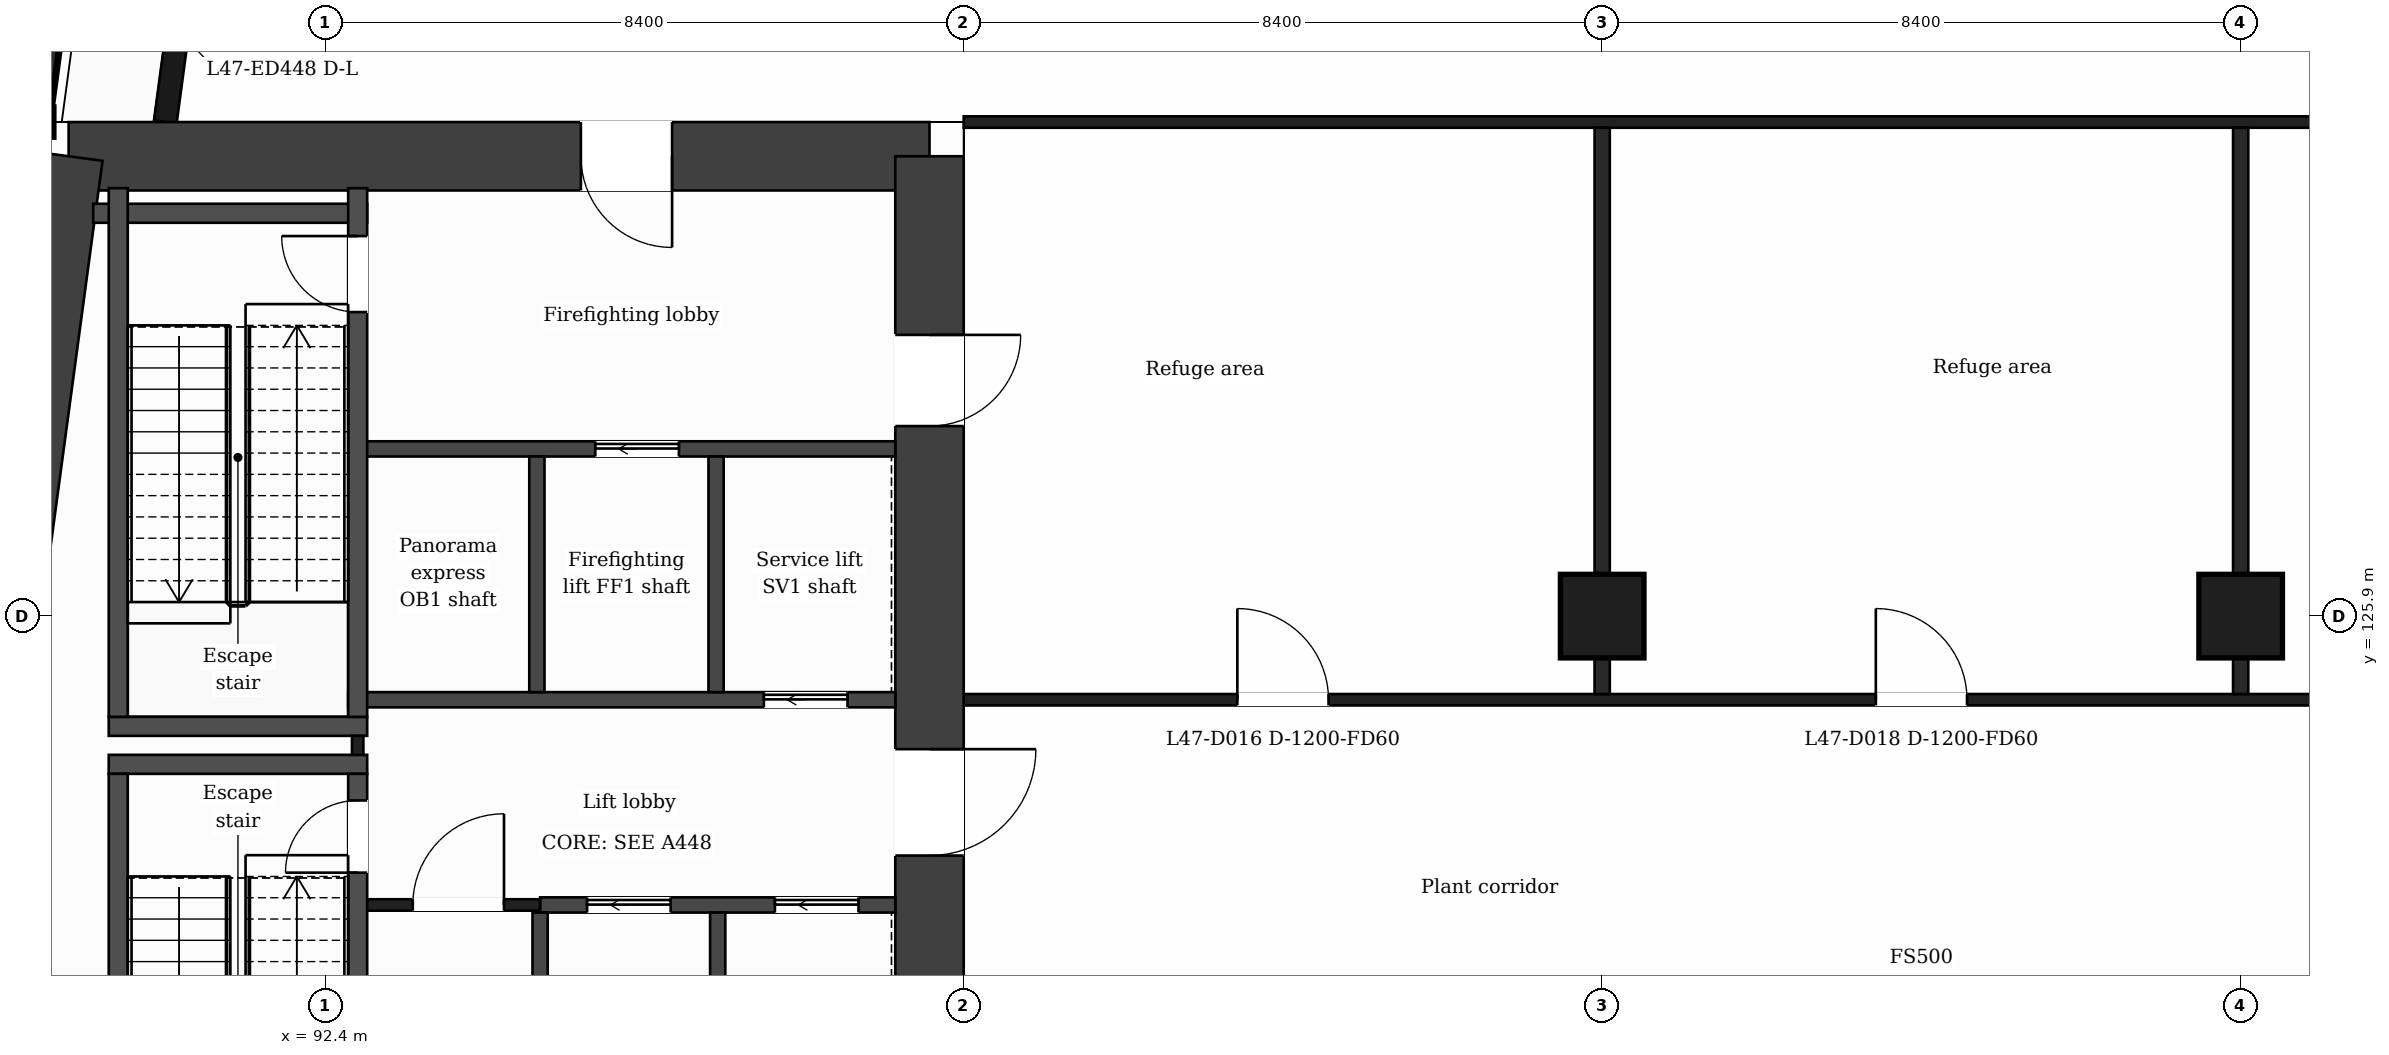
"""IFC4 building model, lengths in metres.
Left out: names, types, materials, properties, quantities, classifications, styles, units other than length and angle.
Written with IfcOpenShell. Run it as: python <this file> out.ifc"""

import sys

from ifc_helpers import new_model, si_unit, direction, frame, frame_2d, origin, origin_2d, place, context, subcontext, project, spatial, rectangle, extrude, element, fill, save


model = new_model("IFC4")
c1 = context("Model", 3, precision=1e-05, world=origin(), true_north=direction((0.0, 1.0)))
c2 = subcontext(c1, "Body", "Model", "MODEL_VIEW")
j1 = project(units=[si_unit("LENGTHUNIT", "METRE"), si_unit("PLANEANGLEUNIT", "RADIAN")], contexts=[c1])
p1 = place(None, origin())
s1 = spatial("IfcSite", under=j1, at=p1, CompositionType="ELEMENT")
p2 = place(p1, origin())
s2 = spatial("IfcBuilding", under=s1, at=p2, CompositionType="ELEMENT")
p3 = place(p2, frame((0.0, 0.0, 197.2)))
s3 = spatial("IfcBuildingStorey", under=s2, at=p3, CompositionType="ELEMENT", Elevation=197.2)
p4 = place(p3, frame((89.024, 131.95, 0.0), z_axis=(0.0, 0.0, 1.0), x_axis=(1.0, 0.0, 0.0)))
e1 = element("IfcWall", 1, at=p4, inside=s3, PredefinedType="SHEAR", context=c2, shape_type="SweptSolid", body=[
    extrude(rectangle(XDim=11.326, YDim=0.9, at=frame_2d((5.663, 0.0))), origin(), (0.0, 0.0, 1.0), 5.0),
])
p5 = place(p4, frame((6.739, 0.0, 0.0)))
e2 = element("IfcOpeningElement", 2, at=p5, cuts=e1, PredefinedType="OPENING", context=c2, shape_type="SweptSolid", body=[
    extrude(rectangle(XDim=1.2, YDim=2.1, at=frame_2d((0.6, 1.05))), frame((0.0, 0.46, 0.0), z_axis=(0.0, -1.0, 0.0), x_axis=(1.0, 0.0, 0.0)), (0.0, 0.0, 1.0), 0.92),
])
p6 = place(p3, frame((100.35, 131.95, 0.0), z_axis=(0.0, 0.0, 1.0), x_axis=(0.0, -1.0, 0.0)))
e3 = element("IfcWall", 3, at=p6, inside=s3, PredefinedType="SHEAR", context=c2, shape_type="SweptSolid", body=[
    extrude(rectangle(XDim=21.1, YDim=0.9, at=frame_2d((10.55, 0.0))), origin(), (0.0, 0.0, 1.0), 5.0),
])
p7 = place(p6, frame((2.35, 0.0, 0.0)))
e4 = element("IfcOpeningElement", 4, at=p7, cuts=e3, PredefinedType="OPENING", context=c2, shape_type="SweptSolid", body=[
    extrude(rectangle(XDim=1.2, YDim=2.1, at=frame_2d((0.6, 1.05))), frame((0.0, 0.46, 0.0), z_axis=(0.0, -1.0, 0.0), x_axis=(1.0, 0.0, 0.0)), (0.0, 0.0, 1.0), 0.92),
])
p8 = place(p6, frame((7.8, 0.0, 0.0)))
e5 = element("IfcOpeningElement", 5, at=p8, cuts=e3, PredefinedType="OPENING", context=c2, shape_type="SweptSolid", body=[
    extrude(rectangle(XDim=1.4, YDim=2.1, at=frame_2d((0.7, 1.05))), frame((0.0, 0.46, 0.0), z_axis=(0.0, -1.0, 0.0), x_axis=(1.0, 0.0, 0.0)), (0.0, 0.0, 1.0), 0.92),
])
p9 = place(p3, frame((86.184, 110.85, 0.0), z_axis=(0.0, 0.0, 1.0), x_axis=(0.133410495943, 0.991060865725, 0.0)))
e6 = element("IfcWall", 6, at=p9, inside=s3, PredefinedType="SHEAR", context=c2, shape_type="SweptSolid", body=[
    extrude(rectangle(XDim=21.29, YDim=0.9, at=frame_2d((10.645, 0.0))), origin(), (0.0, 0.0, 1.0), 5.0),
])
for number, where, z_axis, x_axis in (
    (7, (109.2, 125.9, 0.0), (0.0, 0.0, 1.0), (1.0, 0.0, 0.0)),
    (8, (117.6, 125.9, 0.0), (0.0, 0.0, 1.0), (1.0, 0.0, 0.0)),
):
    element("IfcColumn", number, at=place(p3, frame(where, z_axis=z_axis, x_axis=x_axis)), inside=s3, PredefinedType="COLUMN", context=c2, shape_type="SweptSolid", body=[
        extrude(rectangle(XDim=1.1, YDim=1.1, at=origin_2d()), origin(), (0.0, 0.0, 1.0), 5.0),
    ])
p10 = place(p3, frame((91.177, 138.95, 0.0), z_axis=(0.0, 0.0, 1.0), x_axis=(-0.133426664613, -0.991058689065, 0.0)))
e9 = element("IfcWall", 9, at=p10, inside=s3, PredefinedType="SOLIDWALL", context=c2, shape_type="SweptSolid", body=[
    extrude(rectangle(XDim=6.609, YDim=0.3, at=frame_2d((3.305, 0.0))), origin(), (0.0, 0.0, 1.0), 4.68),
])
p11 = place(p10, frame((4.294, 0.0, 0.0)))
e10 = element("IfcOpeningElement", 10, at=p11, cuts=e9, PredefinedType="OPENING", context=c2, shape_type="SweptSolid", body=[
    extrude(rectangle(XDim=1.2, YDim=2.4, at=frame_2d((0.6, 1.2))), frame((0.0, 0.16, 0.0), z_axis=(0.0, -1.0, 0.0), x_axis=(1.0, 0.0, 0.0)), (0.0, 0.0, 1.0), 0.32),
])
p12 = place(p3, frame((95.227, 122.1, 0.0), z_axis=(0.0, 0.0, 1.0), x_axis=(1.0, 0.0, 0.0)))
e11 = element("IfcWall", 11, at=p12, inside=s3, PredefinedType="PARTITIONING", context=c2, shape_type="SweptSolid", body=[
    extrude(rectangle(XDim=4.673, YDim=0.2, at=frame_2d((2.336, 0.0))), origin(), (0.0, 0.0, 1.0), 4.68),
])
p13 = place(p12, frame((0.618, 0.0, 0.0)))
e12 = element("IfcOpeningElement", 12, at=p13, cuts=e11, PredefinedType="OPENING", context=c2, shape_type="SweptSolid", body=[
    extrude(rectangle(XDim=1.1, YDim=2.1, at=frame_2d((0.55, 1.05))), frame((0.0, 0.11, 0.0), z_axis=(0.0, -1.0, 0.0), x_axis=(1.0, 0.0, 0.0)), (0.0, 0.0, 1.0), 0.22),
])
p14 = place(p12, frame((3.089, 0.0, 0.0)))
e13 = element("IfcOpeningElement", 13, at=p14, cuts=e11, PredefinedType="OPENING", context=c2, shape_type="SweptSolid", body=[
    extrude(rectangle(XDim=1.1, YDim=2.1, at=frame_2d((0.55, 1.05))), frame((0.0, 0.11, 0.0), z_axis=(0.0, -1.0, 0.0), x_axis=(1.0, 0.0, 0.0)), (0.0, 0.0, 1.0), 0.22),
])
p15 = place(p3, frame((92.827, 122.1, 0.0), z_axis=(0.0, 0.0, 1.0), x_axis=(1.0, 0.0, 0.0)))
e14 = element("IfcWall", 14, at=p15, inside=s3, PredefinedType="PARTITIONING", context=c2, shape_type="SweptSolid", body=[
    extrude(rectangle(XDim=2.4, YDim=0.15, at=frame_2d((1.2, 0.0))), origin(), (0.0, 0.0, 1.0), 4.68),
])
p16 = place(p15, frame((0.725, 0.0, 0.0)))
e15 = element("IfcOpeningElement", 15, at=p16, cuts=e14, PredefinedType="OPENING", context=c2, shape_type="SweptSolid", body=[
    extrude(rectangle(XDim=1.2, YDim=2.1, at=frame_2d((0.6, 1.05))), frame((0.0, 0.085, 0.0), z_axis=(0.0, -1.0, 0.0), x_axis=(1.0, 0.0, 0.0)), (0.0, 0.0, 1.0), 0.17),
])
for number, where, z_axis, x_axis in (
    (16, (89.552, 123.95, 0.0), (0.0, 0.0, 1.0), (1.0, 0.0, 0.0)),
    (17, (89.552, 124.45, 0.0), (0.0, 0.0, 1.0), (1.0, 0.0, 0.0)),
):
    element("IfcWall", number, at=place(p3, frame(where, z_axis=z_axis, x_axis=x_axis)), inside=s3, PredefinedType="PARTITIONING", context=c2, shape_type="SweptSolid", body=[
        extrude(rectangle(XDim=3.4, YDim=0.25, at=frame_2d((1.7, 0.0))), origin(), (0.0, 0.0, 1.0), 4.68),
    ])
p17 = place(p3, frame((92.702, 124.8, 0.0), z_axis=(0.0, 0.0, 1.0), x_axis=(1.0, 0.0, 0.0)))
e18 = element("IfcWall", 18, at=p17, inside=s3, PredefinedType="PARTITIONING", context=c2, shape_type="SweptSolid", body=[
    extrude(rectangle(XDim=7.198, YDim=0.2, at=frame_2d((3.599, 0.0))), origin(), (0.0, 0.0, 1.0), 4.68),
])
p18 = place(p17, frame((5.469, 0.0, 0.0)))
e19 = element("IfcOpeningElement", 19, at=p18, cuts=e18, PredefinedType="OPENING", context=c2, shape_type="SweptSolid", body=[
    extrude(rectangle(XDim=1.1, YDim=2.1, at=frame_2d((0.55, 1.05))), frame((0.0, 0.11, 0.0), z_axis=(0.0, -1.0, 0.0), x_axis=(1.0, 0.0, 0.0)), (0.0, 0.0, 1.0), 0.22),
])
p19 = place(p3, frame((100.8, 124.8, 0.0), z_axis=(0.0, 0.0, 1.0), x_axis=(1.0, 0.0, 0.0)))
e20 = element("IfcWall", 20, at=p19, inside=s3, PredefinedType="PARTITIONING", context=c2, shape_type="SweptSolid", body=[
    extrude(rectangle(XDim=25.2, YDim=0.15, at=frame_2d((12.6, 0.0))), origin(), (0.0, 0.0, 1.0), 4.68),
])
p20 = place(p19, frame((3.6, 0.0, 0.0)))
e21 = element("IfcOpeningElement", 21, at=p20, cuts=e20, PredefinedType="OPENING", context=c2, shape_type="SweptSolid", body=[
    extrude(rectangle(XDim=1.2, YDim=2.1, at=frame_2d((0.6, 1.05))), frame((0.0, 0.085, 0.0), z_axis=(0.0, -1.0, 0.0), x_axis=(1.0, 0.0, 0.0)), (0.0, 0.0, 1.0), 0.17),
])
p21 = place(p19, frame((12.0, 0.0, 0.0)))
e22 = element("IfcOpeningElement", 22, at=p21, cuts=e20, PredefinedType="OPENING", context=c2, shape_type="SweptSolid", body=[
    extrude(rectangle(XDim=1.2, YDim=2.1, at=frame_2d((0.6, 1.05))), frame((0.0, 0.085, 0.0), z_axis=(0.0, -1.0, 0.0), x_axis=(1.0, 0.0, 0.0)), (0.0, 0.0, 1.0), 0.17),
])
p22 = place(p19, frame((20.4, 0.0, 0.0)))
e23 = element("IfcOpeningElement", 23, at=p22, cuts=e20, PredefinedType="OPENING", context=c2, shape_type="SweptSolid", body=[
    extrude(rectangle(XDim=1.2, YDim=2.1, at=frame_2d((0.6, 1.05))), frame((0.0, 0.085, 0.0), z_axis=(0.0, -1.0, 0.0), x_axis=(1.0, 0.0, 0.0)), (0.0, 0.0, 1.0), 0.17),
])
p23 = place(p3, frame((92.827, 128.1, 0.0), z_axis=(0.0, 0.0, 1.0), x_axis=(1.0, 0.0, 0.0)))
e24 = element("IfcWall", 24, at=p23, inside=s3, PredefinedType="PARTITIONING", context=c2, shape_type="SweptSolid", body=[
    extrude(rectangle(XDim=7.073, YDim=0.2, at=frame_2d((3.537, 0.0))), origin(), (0.0, 0.0, 1.0), 4.68),
])
p24 = place(p23, frame((3.126, 0.0, 0.0)))
e25 = element("IfcOpeningElement", 25, at=p24, cuts=e24, PredefinedType="OPENING", context=c2, shape_type="SweptSolid", body=[
    extrude(rectangle(XDim=1.1, YDim=2.1, at=frame_2d((0.55, 1.05))), frame((0.0, 0.11, 0.0), z_axis=(0.0, -1.0, 0.0), x_axis=(1.0, 0.0, 0.0)), (0.0, 0.0, 1.0), 0.22),
])
p25 = place(p3, frame((89.347, 131.2, 0.0), z_axis=(0.0, 0.0, 1.0), x_axis=(1.0, 0.0, 0.0)))
e26 = element("IfcWall", 26, at=p25, inside=s3, PredefinedType="PARTITIONING", context=c2, shape_type="SweptSolid", body=[
    extrude(rectangle(XDim=3.604, YDim=0.25, at=frame_2d((1.802, 0.0))), origin(), (0.0, 0.0, 1.0), 4.68),
])
p26 = place(p3, frame((100.8, 132.4, 0.0), z_axis=(0.0, 0.0, 1.0), x_axis=(1.0, 0.0, 0.0)))
e27 = element("IfcWall", 27, at=p26, inside=s3, PredefinedType="PARTITIONING", context=c2, shape_type="SweptSolid", body=[
    extrude(rectangle(XDim=25.2, YDim=0.15, at=frame_2d((12.6, 0.0))), origin(), (0.0, 0.0, 1.0), 4.68),
])
p27 = place(p3, frame((89.677, 116.87, 0.0), z_axis=(0.0, 0.0, 1.0), x_axis=(0.0, 1.0, 0.0)))
e28 = element("IfcWall", 28, at=p27, inside=s3, PredefinedType="PARTITIONING", context=c2, shape_type="SweptSolid", body=[
    extrude(rectangle(XDim=6.955, YDim=0.25, at=frame_2d((3.478, 0.0))), origin(), (0.0, 0.0, 1.0), 4.68),
])
p28 = place(p3, frame((89.677, 124.575, 0.0), z_axis=(0.0, 0.0, 1.0), x_axis=(0.0, 1.0, 0.0)))
e29 = element("IfcWall", 29, at=p28, inside=s3, PredefinedType="PARTITIONING", context=c2, shape_type="SweptSolid", body=[
    extrude(rectangle(XDim=6.955, YDim=0.25, at=frame_2d((3.478, 0.0))), origin(), (0.0, 0.0, 1.0), 4.68),
])
p29 = place(p3, frame((92.827, 124.075, 0.0), z_axis=(0.0, 0.0, 1.0), x_axis=(0.0, 1.0, 0.0)))
e30 = element("IfcWall", 30, at=p29, inside=s3, PredefinedType="PARTITIONING", context=c2, shape_type="SweptSolid", body=[
    extrude(rectangle(XDim=0.25, YDim=0.15, at=frame_2d((0.125, 0.0))), origin(), (0.0, 0.0, 1.0), 4.68),
])
p30 = place(p3, frame((92.827, 116.87, 0.0), z_axis=(0.0, 0.0, 1.0), x_axis=(0.0, 1.0, 0.0)))
e31 = element("IfcWall", 31, at=p30, inside=s3, PredefinedType="PARTITIONING", context=c2, shape_type="SweptSolid", body=[
    extrude(rectangle(XDim=6.955, YDim=0.25, at=frame_2d((3.478, 0.0))), origin(), (0.0, 0.0, 1.0), 4.68),
])
p31 = place(p30, frame((5.655, 0.0, 0.0)))
e32 = element("IfcOpeningElement", 32, at=p31, cuts=e31, PredefinedType="OPENING", context=c2, shape_type="SweptSolid", body=[
    extrude(rectangle(XDim=0.95, YDim=2.1, at=frame_2d((0.475, 1.05))), frame((0.0, 0.135, 0.0), z_axis=(0.0, -1.0, 0.0), x_axis=(1.0, 0.0, 0.0)), (0.0, 0.0, 1.0), 0.27),
])
p32 = place(p3, frame((92.827, 124.575, 0.0), z_axis=(0.0, 0.0, 1.0), x_axis=(0.0, 1.0, 0.0)))
e33 = element("IfcWall", 33, at=p32, inside=s3, PredefinedType="PARTITIONING", context=c2, shape_type="SweptSolid", body=[
    extrude(rectangle(XDim=6.955, YDim=0.25, at=frame_2d((3.478, 0.0))), origin(), (0.0, 0.0, 1.0), 4.68),
])
p33 = place(p32, frame((5.325, 0.0, 0.0)))
e34 = element("IfcOpeningElement", 34, at=p33, cuts=e33, PredefinedType="OPENING", context=c2, shape_type="SweptSolid", body=[
    extrude(rectangle(XDim=1.0, YDim=2.1, at=frame_2d((0.5, 1.05))), frame((0.0, 0.135, 0.0), z_axis=(0.0, -1.0, 0.0), x_axis=(1.0, 0.0, 0.0)), (0.0, 0.0, 1.0), 0.27),
])
p34 = place(p3, frame((95.185, 124.9, 0.0), z_axis=(0.0, 0.0, 1.0), x_axis=(0.0, 1.0, 0.0)))
e35 = element("IfcWall", 35, at=p34, inside=s3, PredefinedType="PARTITIONING", context=c2, shape_type="SweptSolid", body=[
    extrude(rectangle(XDim=3.1, YDim=0.2, at=frame_2d((1.55, 0.0))), origin(), (0.0, 0.0, 1.0), 4.68),
])
p35 = place(p3, frame((95.227, 116.87, 0.0), z_axis=(0.0, 0.0, 1.0), x_axis=(0.0, 1.0, 0.0)))
e36 = element("IfcWall", 36, at=p35, inside=s3, PredefinedType="PARTITIONING", context=c2, shape_type="SweptSolid", body=[
    extrude(rectangle(XDim=5.13, YDim=0.2, at=frame_2d((2.565, 0.0))), origin(), (0.0, 0.0, 1.0), 4.68),
])
p36 = place(p35, frame((0.68, 0.0, 0.0)))
e37 = element("IfcOpeningElement", 37, at=p36, cuts=e36, PredefinedType="OPENING", context=c2, shape_type="SweptSolid", body=[
    extrude(rectangle(XDim=0.9, YDim=2.1, at=frame_2d((0.45, 1.05))), frame((0.0, 0.11, 0.0), z_axis=(0.0, -1.0, 0.0), x_axis=(1.0, 0.0, 0.0)), (0.0, 0.0, 1.0), 0.22),
])
for number, where, z_axis, x_axis in (
    (38, (97.542, 124.9, 0.0), (0.0, 0.0, 1.0), (0.0, 1.0, 0.0)),
    (39, (97.563, 118.9, 0.0), (0.0, 0.0, 1.0), (0.0, 1.0, 0.0)),
):
    element("IfcWall", number, at=place(p3, frame(where, z_axis=z_axis, x_axis=x_axis)), inside=s3, PredefinedType="PARTITIONING", context=c2, shape_type="SweptSolid", body=[
        extrude(rectangle(XDim=3.1, YDim=0.2, at=frame_2d((1.55, 0.0))), origin(), (0.0, 0.0, 1.0), 4.68),
    ])
for number, where, z_axis, x_axis in (
    (40, (109.2, 124.875, 0.0), (0.0, 0.0, 1.0), (0.0, 1.0, 0.0)),
    (41, (117.6, 124.875, 0.0), (0.0, 0.0, 1.0), (0.0, 1.0, 0.0)),
):
    element("IfcWall", number, at=place(p3, frame(where, z_axis=z_axis, x_axis=x_axis)), inside=s3, PredefinedType="PARTITIONING", context=c2, shape_type="SweptSolid", body=[
        extrude(rectangle(XDim=7.45, YDim=0.2, at=frame_2d((3.725, 0.0))), origin(), (0.0, 0.0, 1.0), 4.68),
    ])
p37 = place(p20, origin())
e42 = element("IfcDoor", 42, at=p37, inside=s3, OperationType="SINGLE_SWING_LEFT", PredefinedType="DOOR", context=c2, shape_type="SweptSolid", body=[
    extrude(rectangle(XDim=1.2, YDim=2.1, at=frame_2d((0.6, 1.05))), frame((0.0, 0.025, 0.0), z_axis=(0.0, -1.0, 0.0), x_axis=(1.0, 0.0, 0.0)), (0.0, 0.0, 1.0), 0.05),
])
fill(e21, e42)
p38 = place(p21, origin())
e43 = element("IfcDoor", 43, at=p38, inside=s3, OperationType="SINGLE_SWING_LEFT", PredefinedType="DOOR", context=c2, shape_type="SweptSolid", body=[
    extrude(rectangle(XDim=1.2, YDim=2.1, at=frame_2d((0.6, 1.05))), frame((0.0, 0.025, 0.0), z_axis=(0.0, -1.0, 0.0), x_axis=(1.0, 0.0, 0.0)), (0.0, 0.0, 1.0), 0.05),
])
fill(e22, e43)
p39 = place(p16, origin())
e44 = element("IfcDoor", 44, at=p39, inside=s3, OperationType="SINGLE_SWING_RIGHT", PredefinedType="DOOR", context=c2, shape_type="SweptSolid", body=[
    extrude(rectangle(XDim=1.2, YDim=2.1, at=frame_2d((0.6, 1.05))), frame((0.0, 0.025, 0.0), z_axis=(0.0, -1.0, 0.0), x_axis=(1.0, 0.0, 0.0)), (0.0, 0.0, 1.0), 0.05),
])
fill(e15, e44)
p40 = place(p13, origin())
e45 = element("IfcDoor", 45, at=p40, inside=s3, OperationType="SLIDING_TO_LEFT", PredefinedType="DOOR", context=c2, shape_type="SweptSolid", body=[
    extrude(rectangle(XDim=1.1, YDim=2.1, at=frame_2d((0.55, 1.05))), frame((0.0, 0.025, 0.0), z_axis=(0.0, -1.0, 0.0), x_axis=(1.0, 0.0, 0.0)), (0.0, 0.0, 1.0), 0.05),
])
fill(e12, e45)
p41 = place(p14, origin())
e46 = element("IfcDoor", 46, at=p41, inside=s3, OperationType="SLIDING_TO_LEFT", PredefinedType="DOOR", context=c2, shape_type="SweptSolid", body=[
    extrude(rectangle(XDim=1.1, YDim=2.1, at=frame_2d((0.55, 1.05))), frame((0.0, 0.025, 0.0), z_axis=(0.0, -1.0, 0.0), x_axis=(1.0, 0.0, 0.0)), (0.0, 0.0, 1.0), 0.05),
])
fill(e13, e46)
p42 = place(p24, origin())
e47 = element("IfcDoor", 47, at=p42, inside=s3, OperationType="SLIDING_TO_LEFT", PredefinedType="DOOR", context=c2, shape_type="SweptSolid", body=[
    extrude(rectangle(XDim=1.1, YDim=2.1, at=frame_2d((0.55, 1.05))), frame((0.0, 0.025, 0.0), z_axis=(0.0, -1.0, 0.0), x_axis=(1.0, 0.0, 0.0)), (0.0, 0.0, 1.0), 0.05),
])
fill(e25, e47)
p43 = place(p18, origin())
e48 = element("IfcDoor", 48, at=p43, inside=s3, OperationType="SLIDING_TO_LEFT", PredefinedType="DOOR", context=c2, shape_type="SweptSolid", body=[
    extrude(rectangle(XDim=1.1, YDim=2.1, at=frame_2d((0.55, 1.05))), frame((0.0, 0.025, 0.0), z_axis=(0.0, -1.0, 0.0), x_axis=(1.0, 0.0, 0.0)), (0.0, 0.0, 1.0), 0.05),
])
fill(e19, e48)
p44 = place(p31, origin())
e49 = element("IfcDoor", 49, at=p44, inside=s3, OperationType="SINGLE_SWING_LEFT", PredefinedType="DOOR", context=c2, shape_type="SweptSolid", body=[
    extrude(rectangle(XDim=0.95, YDim=2.1, at=frame_2d((0.475, 1.05))), frame((0.0, 0.025, 0.0), z_axis=(0.0, -1.0, 0.0), x_axis=(1.0, 0.0, 0.0)), (0.0, 0.0, 1.0), 0.05),
])
fill(e32, e49)
p45 = place(p33, origin())
e50 = element("IfcDoor", 50, at=p45, inside=s3, OperationType="SINGLE_SWING_RIGHT", PredefinedType="DOOR", context=c2, shape_type="SweptSolid", body=[
    extrude(rectangle(XDim=1.0, YDim=2.1, at=frame_2d((0.5, 1.05))), frame((0.0, 0.025, 0.0), z_axis=(0.0, -1.0, 0.0), x_axis=(1.0, 0.0, 0.0)), (0.0, 0.0, 1.0), 0.05),
])
fill(e34, e50)
p46 = place(p7, origin())
e51 = element("IfcDoor", 51, at=p46, inside=s3, OperationType="SINGLE_SWING_LEFT", PredefinedType="DOOR", context=c2, shape_type="SweptSolid", body=[
    extrude(rectangle(XDim=1.2, YDim=2.1, at=frame_2d((0.6, 1.05))), frame((0.0, 0.025, 0.0), z_axis=(0.0, -1.0, 0.0), x_axis=(1.0, 0.0, 0.0)), (0.0, 0.0, 1.0), 0.05),
])
fill(e4, e51)
p47 = place(p5, origin())
e52 = element("IfcDoor", 52, at=p47, inside=s3, OperationType="SINGLE_SWING_RIGHT", PredefinedType="DOOR", context=c2, shape_type="SweptSolid", body=[
    extrude(rectangle(XDim=1.2, YDim=2.1, at=frame_2d((0.6, 1.05))), frame((0.0, 0.025, 0.0), z_axis=(0.0, -1.0, 0.0), x_axis=(1.0, 0.0, 0.0)), (0.0, 0.0, 1.0), 0.05),
])
fill(e2, e52)
p48 = place(p8, origin())
e53 = element("IfcDoor", 53, at=p48, inside=s3, OperationType="SINGLE_SWING_LEFT", PredefinedType="DOOR", context=c2, shape_type="SweptSolid", body=[
    extrude(rectangle(XDim=1.4, YDim=2.1, at=frame_2d((0.7, 1.05))), frame((0.0, 0.025, 0.0), z_axis=(0.0, -1.0, 0.0), x_axis=(1.0, 0.0, 0.0)), (0.0, 0.0, 1.0), 0.05),
])
fill(e5, e53)
save(model, sys.argv[1])
